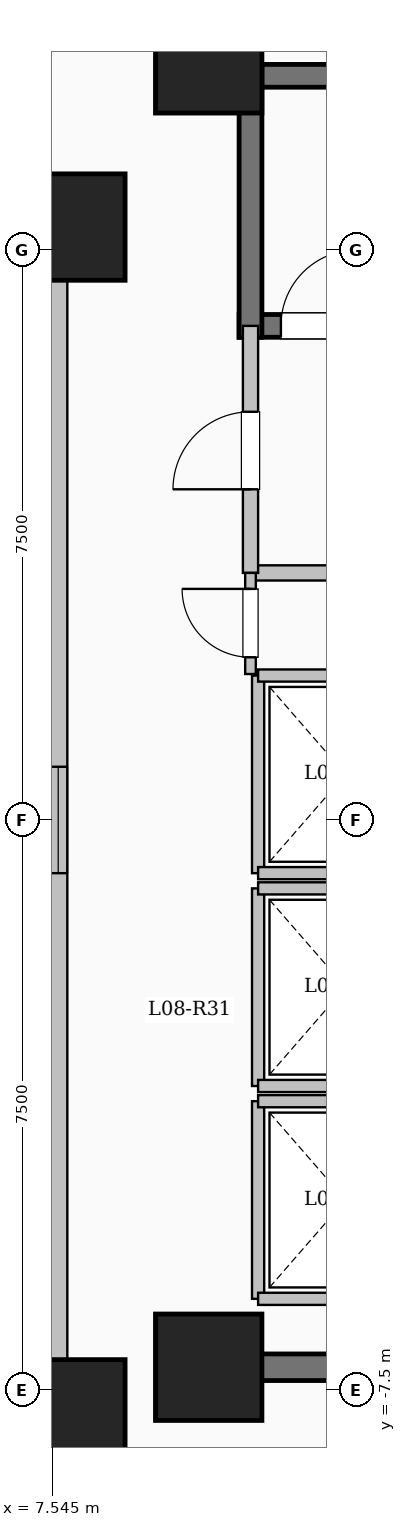
"""IFC4 building model, lengths in metres.
Left out: names, types, materials, properties, quantities, classifications, styles, units other than length and angle.
Written with IfcOpenShell. Run it as: python <this file> out.ifc"""

import sys

from ifc_helpers import new_model, si_unit, direction, frame, frame_2d, origin, origin_2d, place, context, subcontext, project, spatial, rectangle, extrude, element, fill, save


model = new_model("IFC4")
c1 = context("Model", 3, precision=1e-05, world=origin(), true_north=direction((0.0, 1.0)))
c2 = subcontext(c1, "Body", "Model", "MODEL_VIEW")
j1 = project(units=[si_unit("LENGTHUNIT", "METRE"), si_unit("PLANEANGLEUNIT", "RADIAN")], contexts=[c1])
p1 = place(None, origin())
s1 = spatial("IfcSite", under=j1, at=p1, CompositionType="ELEMENT")
p2 = place(p1, origin())
s2 = spatial("IfcBuilding", under=s1, at=p2, CompositionType="ELEMENT")
p3 = place(p2, frame((0.0, 0.0, 34.05)))
s3 = spatial("IfcBuildingStorey", under=s2, at=p3, CompositionType="ELEMENT", Elevation=34.05)
for number, where, z_axis, x_axis in (
    (1, (7.8, -7.8, 0.0), (0.0, 0.0, 1.0), (1.0, 0.0, 0.0)),
    (2, (7.8, 7.8, 0.0), (0.0, 0.0, 1.0), (1.0, 0.0, 0.0)),
    (3, (9.6, -7.2, 0.0), (0.0, 0.0, 1.0), (1.0, 0.0, 0.0)),
    (4, (9.6, 10.0, 0.0), (0.0, 0.0, 1.0), (1.0, 0.0, 0.0)),
):
    element("IfcColumn", number, at=place(p3, frame(where, z_axis=z_axis, x_axis=x_axis)), inside=s3, PredefinedType="COLUMN", context=c2, shape_type="SweptSolid", body=[
        extrude(rectangle(XDim=1.4, YDim=1.4, at=origin_2d()), origin(), (0.0, 0.0, 1.0), 3.35),
    ])
p4 = place(p3, frame((-7.62, -7.62, 0.0), z_axis=(0.0, 0.0, 1.0), x_axis=(1.0, 0.0, 0.0)))
e5 = element("IfcWall", 5, at=p4, inside=s3, PredefinedType="SOLIDWALL", context=c2, shape_type="SweptSolid", body=[
    extrude(rectangle(XDim=15.24, YDim=0.24, at=frame_2d((7.62, 0.0))), origin(), (0.0, 0.0, 1.0), 3.1),
])
p5 = place(p4, frame((6.92, 0.0, 0.95)))
e6 = element("IfcOpeningElement", 6, at=p5, cuts=e5, PredefinedType="OPENING", context=c2, shape_type="SweptSolid", body=[
    extrude(rectangle(XDim=1.4, YDim=1.5, at=frame_2d((0.7, 0.75))), frame((0.0, 0.13, 0.0), z_axis=(0.0, -1.0, 0.0), x_axis=(1.0, 0.0, 0.0)), (0.0, 0.0, 1.0), 0.26),
])
p6 = place(p3, frame((7.62, -7.62, 0.0), z_axis=(0.0, 0.0, 1.0), x_axis=(0.0, 1.0, 0.0)))
e7 = element("IfcWall", 7, at=p6, inside=s3, PredefinedType="SOLIDWALL", context=c2, shape_type="SweptSolid", body=[
    extrude(rectangle(XDim=15.24, YDim=0.24, at=frame_2d((7.62, 0.0))), origin(), (0.0, 0.0, 1.0), 3.1),
])
p7 = place(p6, frame((6.92, 0.0, 0.95)))
e8 = element("IfcOpeningElement", 8, at=p7, cuts=e7, PredefinedType="OPENING", context=c2, shape_type="SweptSolid", body=[
    extrude(rectangle(XDim=1.4, YDim=1.5, at=frame_2d((0.7, 0.75))), frame((0.0, 0.13, 0.0), z_axis=(0.0, -1.0, 0.0), x_axis=(1.0, 0.0, 0.0)), (0.0, 0.0, 1.0), 0.26),
])
p8 = place(p3, frame((7.62, 7.62, 0.0), z_axis=(0.0, 0.0, 1.0), x_axis=(-1.0, 0.0, 0.0)))
e9 = element("IfcWall", 9, at=p8, inside=s3, PredefinedType="SOLIDWALL", context=c2, shape_type="SweptSolid", body=[
    extrude(rectangle(XDim=15.24, YDim=0.24, at=frame_2d((7.62, 0.0))), origin(), (0.0, 0.0, 1.0), 3.1),
])
p9 = place(p8, frame((6.92, 0.0, 0.95)))
e10 = element("IfcOpeningElement", 10, at=p9, cuts=e9, PredefinedType="OPENING", context=c2, shape_type="SweptSolid", body=[
    extrude(rectangle(XDim=1.4, YDim=1.5, at=frame_2d((0.7, 0.75))), frame((0.0, 0.13, 0.0), z_axis=(0.0, -1.0, 0.0), x_axis=(1.0, 0.0, 0.0)), (0.0, 0.0, 1.0), 0.26),
])
p10 = place(p3, frame((10.0, 9.79, 0.0), z_axis=(0.0, 0.0, 1.0), x_axis=(1.0, 0.0, 0.0)))
e11 = element("IfcWall", 11, at=p10, inside=s3, PredefinedType="SHEAR", context=c2, shape_type="SweptSolid", body=[
    extrude(rectangle(XDim=8.0, YDim=0.3, at=frame_2d((4.0, 0.0))), origin(), (0.0, 0.0, 1.0), 3.35),
])
p11 = place(p3, frame((10.0, 6.5, 0.0), z_axis=(0.0, 0.0, 1.0), x_axis=(1.0, 0.0, 0.0)))
e12 = element("IfcWall", 12, at=p11, inside=s3, PredefinedType="SHEAR", context=c2, shape_type="SweptSolid", body=[
    extrude(rectangle(XDim=8.0, YDim=0.3, at=frame_2d((4.0, 0.0))), origin(), (0.0, 0.0, 1.0), 3.35),
])
p12 = place(p11, frame((0.55, 0.0, 0.0)))
e13 = element("IfcOpeningElement", 13, at=p12, cuts=e12, PredefinedType="OPENING", context=c2, shape_type="SweptSolid", body=[
    extrude(rectangle(XDim=1.0, YDim=2.15, at=frame_2d((0.5, 1.075))), frame((0.0, 0.16, 0.0), z_axis=(0.0, -1.0, 0.0), x_axis=(1.0, 0.0, 0.0)), (0.0, 0.0, 1.0), 0.32),
])
p13 = place(p3, frame((10.15, 6.35, 0.0), z_axis=(0.0, 0.0, 1.0), x_axis=(0.0, 1.0, 0.0)))
e14 = element("IfcWall", 14, at=p13, inside=s3, PredefinedType="SHEAR", context=c2, shape_type="SweptSolid", body=[
    extrude(rectangle(XDim=3.59, YDim=0.3, at=frame_2d((1.795, 0.0))), origin(), (0.0, 0.0, 1.0), 3.35),
])
p14 = place(p3, frame((10.15, 3.25, 0.0), z_axis=(0.0, 0.0, 1.0), x_axis=(1.0, 0.0, 0.0)))
e15 = element("IfcWall", 15, at=p14, inside=s3, PredefinedType="SOLIDWALL", context=c2, shape_type="SweptSolid", body=[
    extrude(rectangle(XDim=5.4, YDim=0.2, at=frame_2d((2.7, 0.0))), origin(), (0.0, 0.0, 1.0), 3.1),
])
p15 = place(p3, frame((10.15, 3.25, 0.0), z_axis=(0.0, 0.0, 1.0), x_axis=(0.0, 1.0, 0.0)))
e16 = element("IfcWall", 16, at=p15, inside=s3, PredefinedType="SOLIDWALL", context=c2, shape_type="SweptSolid", body=[
    extrude(rectangle(XDim=3.25, YDim=0.2, at=frame_2d((1.625, 0.0))), origin(), (0.0, 0.0, 1.0), 3.1),
])
p16 = place(p15, frame((1.1, 0.0, 0.0)))
e17 = element("IfcOpeningElement", 17, at=p16, cuts=e16, PredefinedType="OPENING", context=c2, shape_type="SweptSolid", body=[
    extrude(rectangle(XDim=1.02, YDim=2.15, at=frame_2d((0.51, 1.075))), frame((0.0, 0.11, 0.0), z_axis=(0.0, -1.0, 0.0), x_axis=(1.0, 0.0, 0.0)), (0.0, 0.0, 1.0), 0.22),
])
p17 = place(p3, frame((10.25, -6.3, 0.0), z_axis=(0.0, 0.0, 1.0), x_axis=(0.0, 1.0, 0.0)))
e18 = element("IfcWall", 18, at=p17, inside=s3, PredefinedType="SOLIDWALL", context=c2, shape_type="SweptSolid", body=[
    extrude(rectangle(XDim=2.6, YDim=0.16, at=frame_2d((1.3, 0.0))), origin(), (0.0, 0.0, 1.0), 3.1),
])
for number, where, z_axis, x_axis in (
    (19, (10.25, -6.3, 0.0), (0.0, 0.0, 1.0), (1.0, 0.0, 0.0)),
    (20, (10.25, -3.7, 0.0), (0.0, 0.0, 1.0), (1.0, 0.0, 0.0)),
):
    element("IfcWall", number, at=place(p3, frame(where, z_axis=z_axis, x_axis=x_axis)), inside=s3, PredefinedType="SOLIDWALL", context=c2, shape_type="SweptSolid", body=[
        extrude(rectangle(XDim=2.3, YDim=0.16, at=frame_2d((1.15, 0.0))), origin(), (0.0, 0.0, 1.0), 3.1),
    ])
p18 = place(p3, frame((10.25, -3.5, 0.0), z_axis=(0.0, 0.0, 1.0), x_axis=(0.0, 1.0, 0.0)))
e21 = element("IfcWall", 21, at=p18, inside=s3, PredefinedType="SOLIDWALL", context=c2, shape_type="SweptSolid", body=[
    extrude(rectangle(XDim=2.6, YDim=0.16, at=frame_2d((1.3, 0.0))), origin(), (0.0, 0.0, 1.0), 3.1),
])
for number, where, z_axis, x_axis in (
    (22, (10.25, -3.5, 0.0), (0.0, 0.0, 1.0), (1.0, 0.0, 0.0)),
    (23, (10.25, -0.9, 0.0), (0.0, 0.0, 1.0), (1.0, 0.0, 0.0)),
):
    element("IfcWall", number, at=place(p3, frame(where, z_axis=z_axis, x_axis=x_axis)), inside=s3, PredefinedType="SOLIDWALL", context=c2, shape_type="SweptSolid", body=[
        extrude(rectangle(XDim=2.3, YDim=0.16, at=frame_2d((1.15, 0.0))), origin(), (0.0, 0.0, 1.0), 3.1),
    ])
p19 = place(p3, frame((10.25, -0.7, 0.0), z_axis=(0.0, 0.0, 1.0), x_axis=(0.0, 1.0, 0.0)))
e24 = element("IfcWall", 24, at=p19, inside=s3, PredefinedType="SOLIDWALL", context=c2, shape_type="SweptSolid", body=[
    extrude(rectangle(XDim=2.6, YDim=0.16, at=frame_2d((1.3, 0.0))), origin(), (0.0, 0.0, 1.0), 3.1),
])
for number, where, z_axis, x_axis in (
    (25, (10.25, -0.7, 0.0), (0.0, 0.0, 1.0), (1.0, 0.0, 0.0)),
    (26, (10.25, 1.9, 0.0), (0.0, 0.0, 1.0), (1.0, 0.0, 0.0)),
):
    element("IfcWall", number, at=place(p3, frame(where, z_axis=z_axis, x_axis=x_axis)), inside=s3, PredefinedType="SOLIDWALL", context=c2, shape_type="SweptSolid", body=[
        extrude(rectangle(XDim=2.3, YDim=0.16, at=frame_2d((1.15, 0.0))), origin(), (0.0, 0.0, 1.0), 3.1),
    ])
p20 = place(p3, frame((10.075, -7.2, 0.0), z_axis=(0.0, 0.0, 1.0), x_axis=(1.0, 0.0, 0.0)))
e27 = element("IfcWall", 27, at=p20, inside=s3, PredefinedType="SHEAR", context=c2, shape_type="SweptSolid", body=[
    extrude(rectangle(XDim=8.55, YDim=0.35, at=frame_2d((4.275, 0.0))), origin(), (0.0, 0.0, 1.0), 3.35),
])
p21 = place(p3, frame((10.15, 1.92, 0.0), z_axis=(0.0, 0.0, 1.0), x_axis=(0.0, 1.0, 0.0)))
e28 = element("IfcWall", 28, at=p21, inside=s3, PredefinedType="PARTITIONING", context=c2, shape_type="SweptSolid", body=[
    extrude(rectangle(XDim=1.33, YDim=0.14, at=frame_2d((0.665, 0.0))), origin(), (0.0, 0.0, 1.0), 3.1),
])
p22 = place(p21, frame((0.22, 0.0, 0.0)))
e29 = element("IfcOpeningElement", 29, at=p22, cuts=e28, PredefinedType="OPENING", context=c2, shape_type="SweptSolid", body=[
    extrude(rectangle(XDim=0.9, YDim=2.08, at=frame_2d((0.45, 1.04))), frame((0.0, 0.08, 0.0), z_axis=(0.0, -1.0, 0.0), x_axis=(1.0, 0.0, 0.0)), (0.0, 0.0, 1.0), 0.16),
])
p23 = place(p7, origin())
e30 = element("IfcWindow", 30, at=p23, inside=s3, PartitioningType="SINGLE_PANEL", PredefinedType="WINDOW", context=c2, shape_type="SweptSolid", body=[
    extrude(rectangle(XDim=1.4, YDim=1.5, at=frame_2d((0.7, 0.75))), frame((0.0, 0.03, 0.0), z_axis=(0.0, -1.0, 0.0), x_axis=(1.0, 0.0, 0.0)), (0.0, 0.0, 1.0), 0.06),
])
fill(e8, e30)
p24 = place(p12, origin())
e31 = element("IfcDoor", 31, at=p24, inside=s3, OperationType="SINGLE_SWING_RIGHT", PredefinedType="DOOR", context=c2, shape_type="SweptSolid", body=[
    extrude(rectangle(XDim=1.0, YDim=2.15, at=frame_2d((0.5, 1.075))), frame((0.0, 0.025, 0.0), z_axis=(0.0, -1.0, 0.0), x_axis=(1.0, 0.0, 0.0)), (0.0, 0.0, 1.0), 0.05),
])
fill(e13, e31)
p25 = place(p16, origin())
e32 = element("IfcDoor", 32, at=p25, inside=s3, OperationType="SINGLE_SWING_LEFT", PredefinedType="DOOR", context=c2, shape_type="SweptSolid", body=[
    extrude(rectangle(XDim=1.02, YDim=2.15, at=frame_2d((0.51, 1.075))), frame((0.0, 0.025, 0.0), z_axis=(0.0, -1.0, 0.0), x_axis=(1.0, 0.0, 0.0)), (0.0, 0.0, 1.0), 0.05),
])
fill(e17, e32)
p26 = place(p22, origin())
e33 = element("IfcDoor", 33, at=p26, inside=s3, OperationType="SINGLE_SWING_RIGHT", PredefinedType="DOOR", context=c2, shape_type="SweptSolid", body=[
    extrude(rectangle(XDim=0.9, YDim=2.08, at=frame_2d((0.45, 1.04))), frame((0.0, 0.025, 0.0), z_axis=(0.0, -1.0, 0.0), x_axis=(1.0, 0.0, 0.0)), (0.0, 0.0, 1.0), 0.05),
])
fill(e29, e33)
save(model, sys.argv[1])
